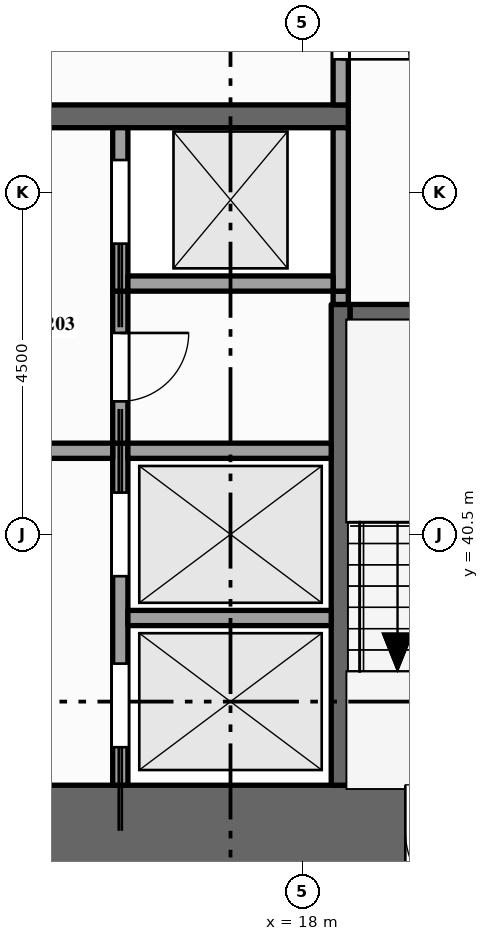
"""IFC4 building model, lengths in metres.
Left out: names, types, materials, properties, quantities, classifications, styles, units other than length and angle.
Written with IfcOpenShell. Run it as: python <this file> out.ifc"""

import sys

from ifc_helpers import new_model, si_unit, direction, frame, frame_2d, origin, place, context, subcontext, project, spatial, rectangle, extrude, element, fill, save


model = new_model("IFC4")
c1 = context("Model", 3, precision=1e-05, world=origin(), true_north=direction((0.0, 1.0)))
c2 = subcontext(c1, "Body", "Model", "MODEL_VIEW")
j1 = project(units=[si_unit("LENGTHUNIT", "METRE"), si_unit("PLANEANGLEUNIT", "RADIAN")], contexts=[c1])
p1 = place(None, origin())
s1 = spatial("IfcSite", under=j1, at=p1, CompositionType="ELEMENT")
p2 = place(p1, origin())
s2 = spatial("IfcBuilding", under=s1, at=p2, CompositionType="ELEMENT")
p3 = place(p2, frame((0.0, 0.0, 14.0)))
s3 = spatial("IfcBuildingStorey", under=s2, at=p3, CompositionType="ELEMENT", Elevation=14.0)
p4 = place(p3, frame((0.0, 36.6, -0.15), z_axis=(0.0, 0.0, 1.0), x_axis=(1.0, 0.0, 0.0)))
e1 = element("IfcWall", 1, at=p4, inside=s3, PredefinedType="SHEAR", context=c2, shape_type="SweptSolid", body=[
    extrude(rectangle(XDim=22.5, YDim=1.2, at=frame_2d((11.25, 0.0))), origin(), (0.0, 0.0, 1.0), 5.0),
])
p5 = place(p4, frame((7.1, 0.0, 0.15)))
e2 = element("IfcOpeningElement", 2, at=p5, cuts=e1, PredefinedType="OPENING", context=c2, shape_type="SweptSolid", body=[
    extrude(rectangle(XDim=1.8, YDim=2.1, at=frame_2d((0.9, 1.05))), frame((0.0, 0.61, 0.0), z_axis=(0.0, -1.0, 0.0), x_axis=(1.0, 0.0, 0.0)), (0.0, 0.0, 1.0), 1.22),
])
p6 = place(p4, frame((13.15, 0.0, 0.15)))
e3 = element("IfcOpeningElement", 3, at=p6, cuts=e1, PredefinedType="OPENING", context=c2, shape_type="SweptSolid", body=[
    extrude(rectangle(XDim=1.1, YDim=2.1, at=frame_2d((0.55, 1.05))), frame((0.0, 0.61, 0.0), z_axis=(0.0, -1.0, 0.0), x_axis=(1.0, 0.0, 0.0)), (0.0, 0.0, 1.0), 1.22),
])
p7 = place(p4, frame((2.15, 0.0, 0.15)))
e4 = element("IfcOpeningElement", 4, at=p7, cuts=e1, PredefinedType="OPENING", context=c2, shape_type="SweptSolid", body=[
    extrude(rectangle(XDim=1.1, YDim=2.1, at=frame_2d((0.55, 1.05))), frame((0.0, 0.61, 0.0), z_axis=(0.0, -1.0, 0.0), x_axis=(1.0, 0.0, 0.0)), (0.0, 0.0, 1.0), 1.22),
])
p8 = place(p4, frame((19.35, 0.0, 0.15)))
e5 = element("IfcOpeningElement", 5, at=p8, cuts=e1, PredefinedType="OPENING", context=c2, shape_type="SweptSolid", body=[
    extrude(rectangle(XDim=1.1, YDim=2.1, at=frame_2d((0.55, 1.05))), frame((0.0, 0.61, 0.0), z_axis=(0.0, -1.0, 0.0), x_axis=(1.0, 0.0, 0.0)), (0.0, 0.0, 1.0), 1.22),
])
p9 = place(p3, frame((15.6, 37.2, 0.0), z_axis=(0.0, 0.0, 1.0), x_axis=(0.0, 1.0, 0.0)))
e6 = element("IfcWall", 6, at=p9, inside=s3, PredefinedType="SOLIDWALL", context=c2, shape_type="SweptSolid", body=[
    extrude(rectangle(XDim=4.5, YDim=0.2, at=frame_2d((2.25, 0.0))), origin(), (0.0, 0.0, 1.0), 4.75),
])
p10 = place(p9, frame((0.5, 0.0, 0.012)))
e7 = element("IfcOpeningElement", 7, at=p10, cuts=e6, PredefinedType="OPENING", context=c2, shape_type="SweptSolid", body=[
    extrude(rectangle(XDim=1.1, YDim=2.1, at=frame_2d((0.55, 1.05))), frame((0.0, 0.11, 0.0), z_axis=(0.0, -1.0, 0.0), x_axis=(1.0, 0.0, 0.0)), (0.0, 0.0, 1.0), 0.22),
])
p11 = place(p9, frame((2.75, 0.0, 0.012)))
e8 = element("IfcOpeningElement", 8, at=p11, cuts=e6, PredefinedType="OPENING", context=c2, shape_type="SweptSolid", body=[
    extrude(rectangle(XDim=1.1, YDim=2.1, at=frame_2d((0.55, 1.05))), frame((0.0, 0.11, 0.0), z_axis=(0.0, -1.0, 0.0), x_axis=(1.0, 0.0, 0.0)), (0.0, 0.0, 1.0), 0.22),
])
p12 = place(p3, frame((15.6, 41.7, 0.0), z_axis=(0.0, 0.0, 1.0), x_axis=(0.0, 1.0, 0.0)))
e9 = element("IfcWall", 9, at=p12, inside=s3, PredefinedType="PARTITIONING", context=c2, shape_type="SweptSolid", body=[
    extrude(rectangle(XDim=2.0, YDim=0.2, at=frame_2d((1.0, 0.0))), origin(), (0.0, 0.0, 1.0), 4.75),
])
p13 = place(p12, frame((0.55, 0.0, 0.0)))
e10 = element("IfcOpeningElement", 10, at=p13, cuts=e9, PredefinedType="OPENING", context=c2, shape_type="SweptSolid", body=[
    extrude(rectangle(XDim=0.9, YDim=2.1, at=frame_2d((0.45, 1.05))), frame((0.0, 0.11, 0.0), z_axis=(0.0, -1.0, 0.0), x_axis=(1.0, 0.0, 0.0)), (0.0, 0.0, 1.0), 0.22),
])
p14 = place(p3, frame((15.6, 43.7, 0.0), z_axis=(0.0, 0.0, 1.0), x_axis=(0.0, 1.0, 0.0)))
e11 = element("IfcWall", 11, at=p14, inside=s3, PredefinedType="SOLIDWALL", context=c2, shape_type="SweptSolid", body=[
    extrude(rectangle(XDim=2.15, YDim=0.2, at=frame_2d((1.075, 0.0))), origin(), (0.0, 0.0, 1.0), 4.75),
])
p15 = place(p14, frame((0.625, 0.0, 0.012)))
e12 = element("IfcOpeningElement", 12, at=p15, cuts=e11, PredefinedType="OPENING", context=c2, shape_type="SweptSolid", body=[
    extrude(rectangle(XDim=1.1, YDim=2.1, at=frame_2d((0.55, 1.05))), frame((0.0, 0.11, 0.0), z_axis=(0.0, -1.0, 0.0), x_axis=(1.0, 0.0, 0.0)), (0.0, 0.0, 1.0), 0.22),
])
p16 = place(p3, frame((18.5, 37.2, 0.0), z_axis=(0.0, 0.0, 1.0), x_axis=(0.0, 1.0, 0.0)))
e13 = element("IfcWall", 13, at=p16, inside=s3, PredefinedType="SHEAR", context=c2, shape_type="SweptSolid", body=[
    extrude(rectangle(XDim=6.325, YDim=0.25, at=frame_2d((3.163, 0.0))), origin(), (0.0, 0.0, 1.0), 4.75),
])
p17 = place(p3, frame((18.5, 43.525, 0.0), z_axis=(0.0, 0.0, 1.0), x_axis=(0.0, 1.0, 0.0)))
e14 = element("IfcWall", 14, at=p17, inside=s3, PredefinedType="PARTITIONING", context=c2, shape_type="SweptSolid", body=[
    extrude(rectangle(XDim=0.175, YDim=0.2, at=frame_2d((0.087, 0.0))), origin(), (0.0, 0.0, 1.0), 4.75),
])
p18 = place(p3, frame((18.5, 43.7, 0.0), z_axis=(0.0, 0.0, 1.0), x_axis=(0.0, 1.0, 0.0)))
e15 = element("IfcWall", 15, at=p18, inside=s3, PredefinedType="SOLIDWALL", context=c2, shape_type="SweptSolid", body=[
    extrude(rectangle(XDim=2.15, YDim=0.2, at=frame_2d((1.075, 0.0))), origin(), (0.0, 0.0, 1.0), 4.75),
])
p19 = place(p3, frame((18.5, 46.15, 0.0), z_axis=(0.0, 0.0, 1.0), x_axis=(0.0, 1.0, 0.0)))
e16 = element("IfcWall", 16, at=p19, inside=s3, PredefinedType="PARTITIONING", context=c2, shape_type="SweptSolid", body=[
    extrude(rectangle(XDim=2.15, YDim=0.2, at=frame_2d((1.075, 0.0))), origin(), (0.0, 0.0, 1.0), 4.75),
])
p20 = place(p19, frame((0.6, 0.0, 0.0)))
e17 = element("IfcOpeningElement", 17, at=p20, cuts=e16, PredefinedType="OPENING", context=c2, shape_type="SweptSolid", body=[
    extrude(rectangle(XDim=0.9, YDim=2.1, at=frame_2d((0.45, 1.05))), frame((0.0, 0.11, 0.0), z_axis=(0.0, -1.0, 0.0), x_axis=(1.0, 0.0, 0.0)), (0.0, 0.0, 1.0), 0.22),
])
p21 = place(p3, frame((15.7, 39.4, 0.0), z_axis=(0.0, 0.0, 1.0), x_axis=(1.0, 0.0, 0.0)))
e18 = element("IfcWall", 18, at=p21, inside=s3, PredefinedType="SOLIDWALL", context=c2, shape_type="SweptSolid", body=[
    extrude(rectangle(XDim=2.675, YDim=0.2, at=frame_2d((1.337, 0.0))), origin(), (0.0, 0.0, 1.0), 4.75),
])
p22 = place(p3, frame((11.9, 41.6, 0.0), z_axis=(0.0, 0.0, 1.0), x_axis=(1.0, 0.0, 0.0)))
e19 = element("IfcWall", 19, at=p22, inside=s3, PredefinedType="PARTITIONING", context=c2, shape_type="SweptSolid", body=[
    extrude(rectangle(XDim=3.6, YDim=0.2, at=frame_2d((1.8, 0.0))), origin(), (0.0, 0.0, 1.0), 4.75),
])
p23 = place(p22, frame((1.3, 0.0, 0.0)))
e20 = element("IfcOpeningElement", 20, at=p23, cuts=e19, PredefinedType="OPENING", context=c2, shape_type="SweptSolid", body=[
    extrude(rectangle(XDim=1.0, YDim=2.1, at=frame_2d((0.5, 1.05))), frame((0.0, 0.11, 0.0), z_axis=(0.0, -1.0, 0.0), x_axis=(1.0, 0.0, 0.0)), (0.0, 0.0, 1.0), 0.22),
])
p24 = place(p3, frame((15.7, 41.6, 0.0), z_axis=(0.0, 0.0, 1.0), x_axis=(1.0, 0.0, 0.0)))
e21 = element("IfcWall", 21, at=p24, inside=s3, PredefinedType="SOLIDWALL", context=c2, shape_type="SweptSolid", body=[
    extrude(rectangle(XDim=2.675, YDim=0.2, at=frame_2d((1.337, 0.0))), origin(), (0.0, 0.0, 1.0), 4.75),
])
p25 = place(p3, frame((18.625, 43.4, 0.0), z_axis=(0.0, 0.0, 1.0), x_axis=(1.0, 0.0, 0.0)))
e22 = element("IfcWall", 22, at=p25, inside=s3, PredefinedType="SHEAR", context=c2, shape_type="SweptSolid", body=[
    extrude(rectangle(XDim=2.675, YDim=0.25, at=frame_2d((1.337, 0.0))), origin(), (0.0, 0.0, 1.0), 4.75),
])
p26 = place(p3, frame((15.7, 43.8, 0.0), z_axis=(0.0, 0.0, 1.0), x_axis=(1.0, 0.0, 0.0)))
e23 = element("IfcWall", 23, at=p26, inside=s3, PredefinedType="SOLIDWALL", context=c2, shape_type="SweptSolid", body=[
    extrude(rectangle(XDim=2.7, YDim=0.2, at=frame_2d((1.35, 0.0))), origin(), (0.0, 0.0, 1.0), 4.75),
])
p27 = place(p3, frame((4.1, 46.0, 0.0), z_axis=(0.0, 0.0, 1.0), x_axis=(1.0, 0.0, 0.0)))
e24 = element("IfcWall", 24, at=p27, inside=s3, PredefinedType="SHEAR", context=c2, shape_type="SweptSolid", body=[
    extrude(rectangle(XDim=14.5, YDim=0.3, at=frame_2d((7.25, 0.0))), origin(), (0.0, 0.0, 1.0), 4.75),
])
p28 = place(p27, frame((3.4, 0.0, 0.0)))
e25 = element("IfcOpeningElement", 25, at=p28, cuts=e24, PredefinedType="OPENING", context=c2, shape_type="SweptSolid", body=[
    extrude(rectangle(XDim=1.0, YDim=2.1, at=frame_2d((0.5, 1.05))), frame((0.0, 0.16, 0.0), z_axis=(0.0, -1.0, 0.0), x_axis=(1.0, 0.0, 0.0)), (0.0, 0.0, 1.0), 0.32),
])
p29 = place(p27, frame((9.1, 0.0, 0.0)))
e26 = element("IfcOpeningElement", 26, at=p29, cuts=e24, PredefinedType="OPENING", context=c2, shape_type="SweptSolid", body=[
    extrude(rectangle(XDim=1.0, YDim=2.1, at=frame_2d((0.5, 1.05))), frame((0.0, 0.16, 0.0), z_axis=(0.0, -1.0, 0.0), x_axis=(1.0, 0.0, 0.0)), (0.0, 0.0, 1.0), 0.32),
])
p30 = place(p10, origin())
e27 = element("IfcDoor", 27, at=p30, inside=s3, OperationType="SLIDING_TO_LEFT", PredefinedType="DOOR", context=c2, shape_type="SweptSolid", body=[
    extrude(rectangle(XDim=1.1, YDim=2.1, at=frame_2d((0.55, 1.05))), frame((0.0, 0.025, 0.0), z_axis=(0.0, -1.0, 0.0), x_axis=(1.0, 0.0, 0.0)), (0.0, 0.0, 1.0), 0.05),
])
fill(e7, e27)
p31 = place(p11, origin())
e28 = element("IfcDoor", 28, at=p31, inside=s3, OperationType="SLIDING_TO_RIGHT", PredefinedType="DOOR", context=c2, shape_type="SweptSolid", body=[
    extrude(rectangle(XDim=1.1, YDim=2.1, at=frame_2d((0.55, 1.05))), frame((0.0, 0.025, 0.0), z_axis=(0.0, -1.0, 0.0), x_axis=(1.0, 0.0, 0.0)), (0.0, 0.0, 1.0), 0.05),
])
fill(e8, e28)
p32 = place(p15, origin())
e29 = element("IfcDoor", 29, at=p32, inside=s3, OperationType="SLIDING_TO_LEFT", PredefinedType="DOOR", context=c2, shape_type="SweptSolid", body=[
    extrude(rectangle(XDim=1.1, YDim=2.1, at=frame_2d((0.55, 1.05))), frame((0.0, 0.025, 0.0), z_axis=(0.0, -1.0, 0.0), x_axis=(1.0, 0.0, 0.0)), (0.0, 0.0, 1.0), 0.05),
])
fill(e12, e29)
p33 = place(p8, origin())
e30 = element("IfcDoor", 30, at=p33, inside=s3, OperationType="SINGLE_SWING_RIGHT", PredefinedType="DOOR", context=c2, shape_type="SweptSolid", body=[
    extrude(rectangle(XDim=1.1, YDim=2.1, at=frame_2d((0.55, 1.05))), frame((0.0, 0.025, 0.0), z_axis=(0.0, -1.0, 0.0), x_axis=(1.0, 0.0, 0.0)), (0.0, 0.0, 1.0), 0.05),
])
fill(e5, e30)
p34 = place(p20, origin())
e31 = element("IfcDoor", 31, at=p34, inside=s3, OperationType="SINGLE_SWING_LEFT", PredefinedType="DOOR", context=c2, shape_type="SweptSolid", body=[
    extrude(rectangle(XDim=0.9, YDim=2.1, at=frame_2d((0.45, 1.05))), frame((0.0, 0.025, 0.0), z_axis=(0.0, -1.0, 0.0), x_axis=(1.0, 0.0, 0.0)), (0.0, 0.0, 1.0), 0.05),
])
fill(e17, e31)
p35 = place(p13, origin())
e32 = element("IfcDoor", 32, at=p35, inside=s3, OperationType="SINGLE_SWING_RIGHT", PredefinedType="DOOR", context=c2, shape_type="SweptSolid", body=[
    extrude(rectangle(XDim=0.9, YDim=2.1, at=frame_2d((0.45, 1.05))), frame((0.0, 0.025, 0.0), z_axis=(0.0, -1.0, 0.0), x_axis=(1.0, 0.0, 0.0)), (0.0, 0.0, 1.0), 0.05),
])
fill(e10, e32)
save(model, sys.argv[1])
